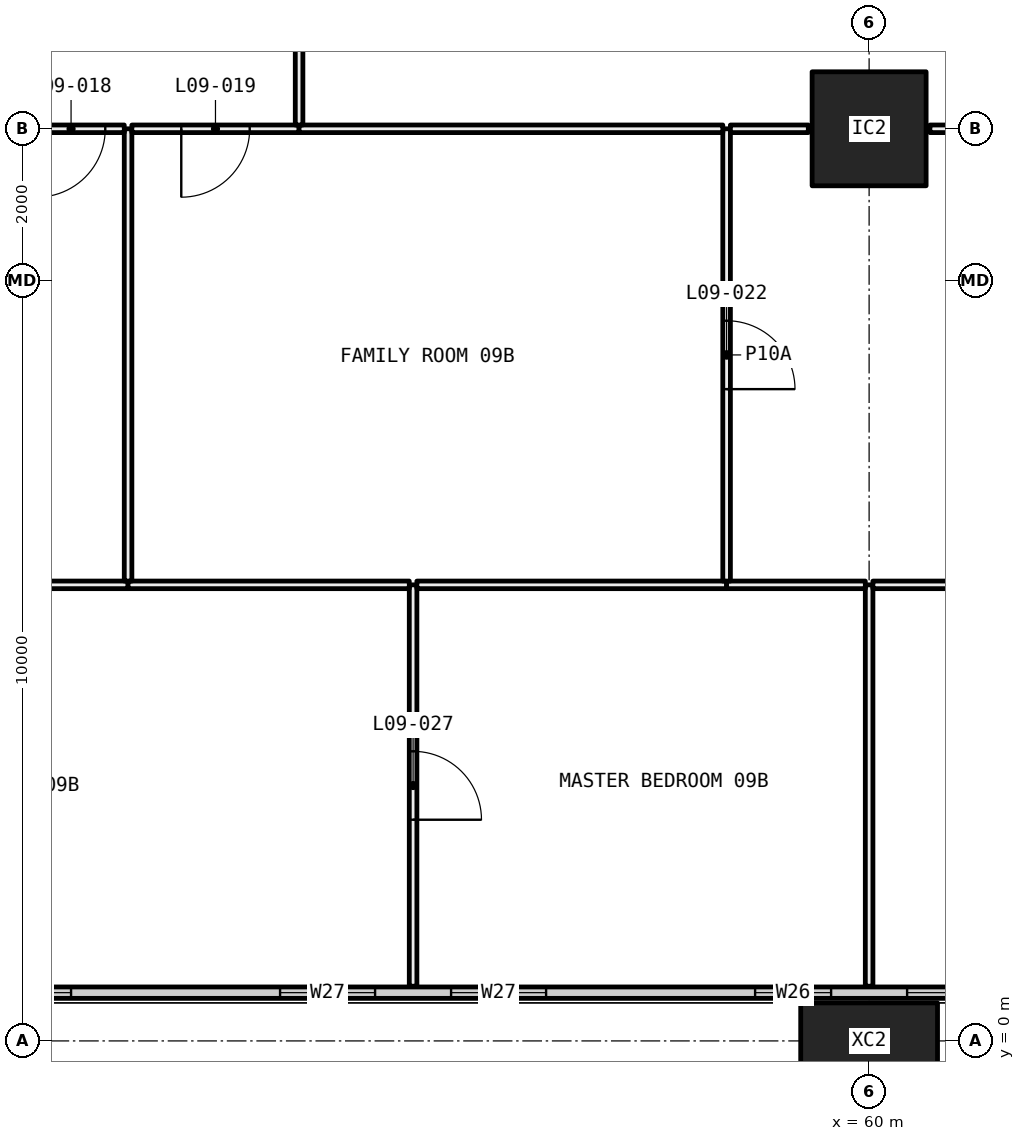
"""IFC4 building model, lengths in metres.
Left out: names, types, materials, properties, quantities, classifications, styles, units other than length and angle.
Written with IfcOpenShell. Run it as: python <this file> out.ifc"""

import sys

from ifc_helpers import new_model, si_unit, direction, frame, frame_2d, origin, origin_2d, place, context, subcontext, project, spatial, rectangle, hollow_rectangle, extrude, element, fill, save


model = new_model("IFC4")
c1 = context("Model", 3, precision=1e-05, world=origin(), true_north=direction((0.0, 1.0)))
c2 = subcontext(c1, "Body", "Model", "MODEL_VIEW")
j1 = project(units=[si_unit("LENGTHUNIT", "METRE"), si_unit("PLANEANGLEUNIT", "RADIAN")], contexts=[c1])
p1 = place(None, origin())
s1 = spatial("IfcSite", under=j1, at=p1, CompositionType="ELEMENT")
p2 = place(p1, origin())
s2 = spatial("IfcBuilding", under=s1, at=p2, CompositionType="ELEMENT")
p3 = place(p2, frame((0.0, 0.0, 43.8)))
s3 = spatial("IfcBuildingStorey", under=s2, at=p3, CompositionType="ELEMENT", Elevation=43.8)
p4 = place(p3, frame((60.0, 0.0, -0.4), z_axis=(0.0, 0.0, 1.0), x_axis=(1.0, 0.0, 0.0)))
e1 = element("IfcColumn", 1, at=p4, inside=s3, PredefinedType="COLUMN", context=c2, shape_type="SweptSolid", body=[
    extrude(hollow_rectangle(XDim=1.8, YDim=1.0, WallThickness=0.07, at=origin_2d()), origin(), (0.0, 0.0, 1.0), 3.45),
])
p5 = place(p3, frame((60.0, 12.0, 0.0), z_axis=(0.0, 0.0, 1.0), x_axis=(1.0, 0.0, 0.0)))
e2 = element("IfcColumn", 2, at=p5, inside=s3, PredefinedType="COLUMN", context=c2, shape_type="SweptSolid", body=[
    extrude(hollow_rectangle(XDim=1.5, YDim=1.5, WallThickness=0.065, at=origin_2d()), origin(), (0.0, 0.0, 1.0), 3.05),
])
p6 = place(p3, frame((6.56, 0.635, 0.0), z_axis=(0.0, 0.0, 1.0), x_axis=(1.0, 0.0, 0.0)))
e3 = element("IfcWall", 3, at=p6, inside=s3, PredefinedType="ELEMENTEDWALL", context=c2, shape_type="SweptSolid", body=[
    extrude(rectangle(XDim=58.88, YDim=0.15, at=frame_2d((29.44, 0.0))), origin(), (0.0, 0.0, 1.0), 3.05),
])
p7 = place(p6, frame((0.44, 0.0, 0.45)))
e4 = element("IfcOpeningElement", 4, at=p7, cuts=e3, PredefinedType="OPENING", context=c2, shape_type="SweptSolid", body=[
    extrude(rectangle(XDim=4.5, YDim=2.55, at=frame_2d((2.25, 1.275))), frame((0.0, 0.085, 0.0), z_axis=(0.0, -1.0, 0.0), x_axis=(1.0, 0.0, 0.0)), (0.0, 0.0, 1.0), 0.17),
])
p8 = place(p6, frame((5.94, 0.0, 0.45)))
e5 = element("IfcOpeningElement", 5, at=p8, cuts=e3, PredefinedType="OPENING", context=c2, shape_type="SweptSolid", body=[
    extrude(rectangle(XDim=1.0, YDim=2.55, at=frame_2d((0.5, 1.275))), frame((0.0, 0.085, 0.0), z_axis=(0.0, -1.0, 0.0), x_axis=(1.0, 0.0, 0.0)), (0.0, 0.0, 1.0), 0.17),
])
p9 = place(p6, frame((9.69, 0.0, 0.45)))
e6 = element("IfcOpeningElement", 6, at=p9, cuts=e3, PredefinedType="OPENING", context=c2, shape_type="SweptSolid", body=[
    extrude(rectangle(XDim=1.25, YDim=2.55, at=frame_2d((0.625, 1.275))), frame((0.0, 0.085, 0.0), z_axis=(0.0, -1.0, 0.0), x_axis=(1.0, 0.0, 0.0)), (0.0, 0.0, 1.0), 0.17),
])
p10 = place(p6, frame((11.94, 0.0, 0.45)))
e7 = element("IfcOpeningElement", 7, at=p10, cuts=e3, PredefinedType="OPENING", context=c2, shape_type="SweptSolid", body=[
    extrude(rectangle(XDim=1.25, YDim=2.55, at=frame_2d((0.625, 1.275))), frame((0.0, 0.085, 0.0), z_axis=(0.0, -1.0, 0.0), x_axis=(1.0, 0.0, 0.0)), (0.0, 0.0, 1.0), 0.17),
])
p11 = place(p6, frame((15.94, 0.0, 0.45)))
e8 = element("IfcOpeningElement", 8, at=p11, cuts=e3, PredefinedType="OPENING", context=c2, shape_type="SweptSolid", body=[
    extrude(rectangle(XDim=1.0, YDim=2.55, at=frame_2d((0.5, 1.275))), frame((0.0, 0.085, 0.0), z_axis=(0.0, -1.0, 0.0), x_axis=(1.0, 0.0, 0.0)), (0.0, 0.0, 1.0), 0.17),
])
p12 = place(p6, frame((17.94, 0.0, 0.45)))
e9 = element("IfcOpeningElement", 9, at=p12, cuts=e3, PredefinedType="OPENING", context=c2, shape_type="SweptSolid", body=[
    extrude(rectangle(XDim=1.0, YDim=2.55, at=frame_2d((0.5, 1.275))), frame((0.0, 0.085, 0.0), z_axis=(0.0, -1.0, 0.0), x_axis=(1.0, 0.0, 0.0)), (0.0, 0.0, 1.0), 0.17),
])
p13 = place(p6, frame((21.69, 0.0, 0.45)))
e10 = element("IfcOpeningElement", 10, at=p13, cuts=e3, PredefinedType="OPENING", context=c2, shape_type="SweptSolid", body=[
    extrude(rectangle(XDim=1.25, YDim=2.55, at=frame_2d((0.625, 1.275))), frame((0.0, 0.085, 0.0), z_axis=(0.0, -1.0, 0.0), x_axis=(1.0, 0.0, 0.0)), (0.0, 0.0, 1.0), 0.17),
])
p14 = place(p6, frame((23.94, 0.0, 0.45)))
e11 = element("IfcOpeningElement", 11, at=p14, cuts=e3, PredefinedType="OPENING", context=c2, shape_type="SweptSolid", body=[
    extrude(rectangle(XDim=1.25, YDim=2.55, at=frame_2d((0.625, 1.275))), frame((0.0, 0.085, 0.0), z_axis=(0.0, -1.0, 0.0), x_axis=(1.0, 0.0, 0.0)), (0.0, 0.0, 1.0), 0.17),
])
p15 = place(p6, frame((27.94, 0.0, 0.45)))
e12 = element("IfcOpeningElement", 12, at=p15, cuts=e3, PredefinedType="OPENING", context=c2, shape_type="SweptSolid", body=[
    extrude(rectangle(XDim=1.0, YDim=2.55, at=frame_2d((0.5, 1.275))), frame((0.0, 0.085, 0.0), z_axis=(0.0, -1.0, 0.0), x_axis=(1.0, 0.0, 0.0)), (0.0, 0.0, 1.0), 0.17),
])
p16 = place(p6, frame((29.94, 0.0, 0.45)))
e13 = element("IfcOpeningElement", 13, at=p16, cuts=e3, PredefinedType="OPENING", context=c2, shape_type="SweptSolid", body=[
    extrude(rectangle(XDim=1.0, YDim=2.55, at=frame_2d((0.5, 1.275))), frame((0.0, 0.085, 0.0), z_axis=(0.0, -1.0, 0.0), x_axis=(1.0, 0.0, 0.0)), (0.0, 0.0, 1.0), 0.17),
])
p17 = place(p6, frame((33.69, 0.0, 0.45)))
e14 = element("IfcOpeningElement", 14, at=p17, cuts=e3, PredefinedType="OPENING", context=c2, shape_type="SweptSolid", body=[
    extrude(rectangle(XDim=1.25, YDim=2.55, at=frame_2d((0.625, 1.275))), frame((0.0, 0.085, 0.0), z_axis=(0.0, -1.0, 0.0), x_axis=(1.0, 0.0, 0.0)), (0.0, 0.0, 1.0), 0.17),
])
p18 = place(p6, frame((35.94, 0.0, 0.45)))
e15 = element("IfcOpeningElement", 15, at=p18, cuts=e3, PredefinedType="OPENING", context=c2, shape_type="SweptSolid", body=[
    extrude(rectangle(XDim=1.25, YDim=2.55, at=frame_2d((0.625, 1.275))), frame((0.0, 0.085, 0.0), z_axis=(0.0, -1.0, 0.0), x_axis=(1.0, 0.0, 0.0)), (0.0, 0.0, 1.0), 0.17),
])
p19 = place(p6, frame((39.94, 0.0, 0.45)))
e16 = element("IfcOpeningElement", 16, at=p19, cuts=e3, PredefinedType="OPENING", context=c2, shape_type="SweptSolid", body=[
    extrude(rectangle(XDim=1.0, YDim=2.55, at=frame_2d((0.5, 1.275))), frame((0.0, 0.085, 0.0), z_axis=(0.0, -1.0, 0.0), x_axis=(1.0, 0.0, 0.0)), (0.0, 0.0, 1.0), 0.17),
])
p20 = place(p6, frame((41.94, 0.0, 0.45)))
e17 = element("IfcOpeningElement", 17, at=p20, cuts=e3, PredefinedType="OPENING", context=c2, shape_type="SweptSolid", body=[
    extrude(rectangle(XDim=1.0, YDim=2.55, at=frame_2d((0.5, 1.275))), frame((0.0, 0.085, 0.0), z_axis=(0.0, -1.0, 0.0), x_axis=(1.0, 0.0, 0.0)), (0.0, 0.0, 1.0), 0.17),
])
p21 = place(p6, frame((45.69, 0.0, 0.45)))
e18 = element("IfcOpeningElement", 18, at=p21, cuts=e3, PredefinedType="OPENING", context=c2, shape_type="SweptSolid", body=[
    extrude(rectangle(XDim=1.25, YDim=2.55, at=frame_2d((0.625, 1.275))), frame((0.0, 0.085, 0.0), z_axis=(0.0, -1.0, 0.0), x_axis=(1.0, 0.0, 0.0)), (0.0, 0.0, 1.0), 0.17),
])
p22 = place(p6, frame((47.94, 0.0, 0.45)))
e19 = element("IfcOpeningElement", 19, at=p22, cuts=e3, PredefinedType="OPENING", context=c2, shape_type="SweptSolid", body=[
    extrude(rectangle(XDim=1.25, YDim=2.55, at=frame_2d((0.625, 1.275))), frame((0.0, 0.085, 0.0), z_axis=(0.0, -1.0, 0.0), x_axis=(1.0, 0.0, 0.0)), (0.0, 0.0, 1.0), 0.17),
])
p23 = place(p6, frame((51.94, 0.0, 0.45)))
e20 = element("IfcOpeningElement", 20, at=p23, cuts=e3, PredefinedType="OPENING", context=c2, shape_type="SweptSolid", body=[
    extrude(rectangle(XDim=1.0, YDim=2.55, at=frame_2d((0.5, 1.275))), frame((0.0, 0.085, 0.0), z_axis=(0.0, -1.0, 0.0), x_axis=(1.0, 0.0, 0.0)), (0.0, 0.0, 1.0), 0.17),
])
p24 = place(p6, frame((53.94, 0.0, 0.45)))
e21 = element("IfcOpeningElement", 21, at=p24, cuts=e3, PredefinedType="OPENING", context=c2, shape_type="SweptSolid", body=[
    extrude(rectangle(XDim=4.5, YDim=2.55, at=frame_2d((2.25, 1.275))), frame((0.0, 0.085, 0.0), z_axis=(0.0, -1.0, 0.0), x_axis=(1.0, 0.0, 0.0)), (0.0, 0.0, 1.0), 0.17),
])
p25 = place(p3, frame((54.0, 0.72, 0.0), z_axis=(0.0, 0.0, 1.0), x_axis=(0.0, 1.0, 0.0)))
e22 = element("IfcWall", 22, at=p25, inside=s3, PredefinedType="PARTITIONING", context=c2, shape_type="SweptSolid", body=[
    extrude(rectangle(XDim=5.28, YDim=0.1, at=frame_2d((2.64, 0.0))), origin(), (0.0, 0.0, 1.0), 3.05),
])
p26 = place(p25, frame((2.19, 0.0, 0.0)))
e23 = element("IfcOpeningElement", 23, at=p26, cuts=e22, PredefinedType="OPENING", context=c2, shape_type="SweptSolid", body=[
    extrude(rectangle(XDim=0.9, YDim=2.1, at=frame_2d((0.45, 1.05))), frame((0.0, 0.06, 0.0), z_axis=(0.0, -1.0, 0.0), x_axis=(1.0, 0.0, 0.0)), (0.0, 0.0, 1.0), 0.12),
])
p27 = place(p3, frame((50.25, 6.0, 0.0), z_axis=(0.0, 0.0, 1.0), x_axis=(-1.0, 0.0, 0.0)))
e24 = element("IfcWall", 24, at=p27, inside=s3, PredefinedType="PARTITIONING", context=c2, shape_type="SweptSolid", body=[
    extrude(rectangle(XDim=2.35, YDim=0.1, at=frame_2d((1.175, 0.0))), origin(), (0.0, 0.0, 1.0), 2.45),
])
p28 = place(p3, frame((53.95, 6.0, 0.0), z_axis=(0.0, 0.0, 1.0), x_axis=(-1.0, 0.0, 0.0)))
e25 = element("IfcWall", 25, at=p28, inside=s3, PredefinedType="PARTITIONING", context=c2, shape_type="SweptSolid", body=[
    extrude(rectangle(XDim=3.7, YDim=0.1, at=frame_2d((1.85, 0.0))), origin(), (0.0, 0.0, 1.0), 3.05),
])
p29 = place(p3, frame((60.0, 0.72, 0.0), z_axis=(0.0, 0.0, 1.0), x_axis=(0.0, 1.0, 0.0)))
e26 = element("IfcWall", 26, at=p29, inside=s3, PredefinedType="PARTITIONING", context=c2, shape_type="SweptSolid", body=[
    extrude(rectangle(XDim=5.28, YDim=0.1, at=frame_2d((2.64, 0.0))), origin(), (0.0, 0.0, 1.0), 2.45),
])
p30 = place(p3, frame((58.125, 6.0, 0.0), z_axis=(0.0, 0.0, 1.0), x_axis=(-1.0, 0.0, 0.0)))
e27 = element("IfcWall", 27, at=p30, inside=s3, PredefinedType="PARTITIONING", context=c2, shape_type="SweptSolid", body=[
    extrude(rectangle(XDim=4.075, YDim=0.1, at=frame_2d((2.038, 0.0))), origin(), (0.0, 0.0, 1.0), 3.05),
])
p31 = place(p3, frame((59.95, 6.0, 0.0), z_axis=(0.0, 0.0, 1.0), x_axis=(-1.0, 0.0, 0.0)))
e28 = element("IfcWall", 28, at=p31, inside=s3, PredefinedType="PARTITIONING", context=c2, shape_type="SweptSolid", body=[
    extrude(rectangle(XDim=1.825, YDim=0.1, at=frame_2d((0.913, 0.0))), origin(), (0.0, 0.0, 1.0), 2.45),
])
p32 = place(p3, frame((65.28, 6.0, 0.0), z_axis=(0.0, 0.0, 1.0), x_axis=(-1.0, 0.0, 0.0)))
e29 = element("IfcWall", 29, at=p32, inside=s3, PredefinedType="PARTITIONING", context=c2, shape_type="SweptSolid", body=[
    extrude(rectangle(XDim=5.23, YDim=0.1, at=frame_2d((2.615, 0.0))), origin(), (0.0, 0.0, 1.0), 2.45),
])
p33 = place(p32, frame((2.165, 0.0, 0.0)))
e30 = element("IfcOpeningElement", 30, at=p33, cuts=e29, PredefinedType="OPENING", context=c2, shape_type="SweptSolid", body=[
    extrude(rectangle(XDim=0.9, YDim=2.1, at=frame_2d((0.45, 1.05))), frame((0.0, 0.06, 0.0), z_axis=(0.0, -1.0, 0.0), x_axis=(1.0, 0.0, 0.0)), (0.0, 0.0, 1.0), 0.12),
])
p34 = place(p3, frame((50.25, 6.05, 0.0), z_axis=(0.0, 0.0, 1.0), x_axis=(0.0, 1.0, 0.0)))
e31 = element("IfcWall", 31, at=p34, inside=s3, PredefinedType="PARTITIONING", context=c2, shape_type="SweptSolid", body=[
    extrude(rectangle(XDim=5.95, YDim=0.1, at=frame_2d((2.975, 0.0))), origin(), (0.0, 0.0, 1.0), 2.45),
])
p35 = place(p3, frame((50.2, 12.0, 0.0), z_axis=(0.0, 0.0, 1.0), x_axis=(-1.0, 0.0, 0.0)))
e32 = element("IfcWall", 32, at=p35, inside=s3, PredefinedType="PARTITIONING", context=c2, shape_type="SweptSolid", body=[
    extrude(rectangle(XDim=1.4, YDim=0.1, at=frame_2d((0.7, 0.0))), origin(), (0.0, 0.0, 1.0), 2.45),
])
p36 = place(p35, frame((0.25, 0.0, 0.0)))
e33 = element("IfcOpeningElement", 33, at=p36, cuts=e32, PredefinedType="OPENING", context=c2, shape_type="SweptSolid", body=[
    extrude(rectangle(XDim=0.9, YDim=2.1, at=frame_2d((0.45, 1.05))), frame((0.0, 0.06, 0.0), z_axis=(0.0, -1.0, 0.0), x_axis=(1.0, 0.0, 0.0)), (0.0, 0.0, 1.0), 0.12),
])
p37 = place(p3, frame((58.125, 6.05, 0.0), z_axis=(0.0, 0.0, 1.0), x_axis=(0.0, 1.0, 0.0)))
e34 = element("IfcWall", 34, at=p37, inside=s3, PredefinedType="PARTITIONING", context=c2, shape_type="SweptSolid", body=[
    extrude(rectangle(XDim=5.95, YDim=0.1, at=frame_2d((2.975, 0.0))), origin(), (0.0, 0.0, 1.0), 2.45),
])
p38 = place(p37, frame((2.525, 0.0, 0.0)))
e35 = element("IfcOpeningElement", 35, at=p38, cuts=e34, PredefinedType="OPENING", context=c2, shape_type="SweptSolid", body=[
    extrude(rectangle(XDim=0.9, YDim=2.1, at=frame_2d((0.45, 1.05))), frame((0.0, 0.06, 0.0), z_axis=(0.0, -1.0, 0.0), x_axis=(1.0, 0.0, 0.0)), (0.0, 0.0, 1.0), 0.12),
])
p39 = place(p3, frame((52.5, 12.0, 0.0), z_axis=(0.0, 0.0, 1.0), x_axis=(-1.0, 0.0, 0.0)))
e36 = element("IfcWall", 36, at=p39, inside=s3, PredefinedType="PARTITIONING", context=c2, shape_type="SweptSolid", body=[
    extrude(rectangle(XDim=2.2, YDim=0.1, at=frame_2d((1.1, 0.0))), origin(), (0.0, 0.0, 1.0), 2.45),
])
p40 = place(p39, frame((0.65, 0.0, 0.0)))
e37 = element("IfcOpeningElement", 37, at=p40, cuts=e36, PredefinedType="OPENING", context=c2, shape_type="SweptSolid", body=[
    extrude(rectangle(XDim=0.9, YDim=2.1, at=frame_2d((0.45, 1.05))), frame((0.0, 0.06, 0.0), z_axis=(0.0, -1.0, 0.0), x_axis=(1.0, 0.0, 0.0)), (0.0, 0.0, 1.0), 0.12),
])
p41 = place(p3, frame((58.075, 12.0, 0.0), z_axis=(0.0, 0.0, 1.0), x_axis=(-1.0, 0.0, 0.0)))
e38 = element("IfcWall", 38, at=p41, inside=s3, PredefinedType="PARTITIONING", context=c2, shape_type="SweptSolid", body=[
    extrude(rectangle(XDim=5.575, YDim=0.1, at=frame_2d((2.788, 0.0))), origin(), (0.0, 0.0, 1.0), 2.45),
])
p42 = place(p3, frame((59.2, 12.0, 0.0), z_axis=(0.0, 0.0, 1.0), x_axis=(-1.0, 0.0, 0.0)))
e39 = element("IfcWall", 39, at=p42, inside=s3, PredefinedType="PARTITIONING", context=c2, shape_type="SweptSolid", body=[
    extrude(rectangle(XDim=1.025, YDim=0.1, at=frame_2d((0.512, 0.0))), origin(), (0.0, 0.0, 1.0), 2.45),
])
p43 = place(p3, frame((61.425, 12.0, 0.0), z_axis=(0.0, 0.0, 1.0), x_axis=(-1.0, 0.0, 0.0)))
e40 = element("IfcWall", 40, at=p43, inside=s3, PredefinedType="PARTITIONING", context=c2, shape_type="SweptSolid", body=[
    extrude(rectangle(XDim=0.625, YDim=0.1, at=frame_2d((0.312, 0.0))), origin(), (0.0, 0.0, 1.0), 2.45),
])
p44 = place(p3, frame((52.5, 12.05, 0.0), z_axis=(0.0, 0.0, 1.0), x_axis=(0.0, 1.0, 0.0)))
e41 = element("IfcWall", 41, at=p44, inside=s3, PredefinedType="PARTITIONING", context=c2, shape_type="SweptSolid", body=[
    extrude(rectangle(XDim=5.85, YDim=0.1, at=frame_2d((2.925, 0.0))), origin(), (0.0, 0.0, 1.0), 2.45),
])
p45 = place(p44, frame((2.475, 0.0, 0.0)))
e42 = element("IfcOpeningElement", 42, at=p45, cuts=e41, PredefinedType="OPENING", context=c2, shape_type="SweptSolid", body=[
    extrude(rectangle(XDim=0.9, YDim=2.1, at=frame_2d((0.45, 1.05))), frame((0.0, 0.06, 0.0), z_axis=(0.0, -1.0, 0.0), x_axis=(1.0, 0.0, 0.0)), (0.0, 0.0, 1.0), 0.12),
])
p46 = place(p20, origin())
e43 = element("IfcWindow", 43, at=p46, inside=s3, PartitioningType="SINGLE_PANEL", PredefinedType="WINDOW", context=c2, shape_type="SweptSolid", body=[
    extrude(rectangle(XDim=1.0, YDim=2.55, at=frame_2d((0.5, 1.275))), frame((0.0, 0.03, 0.0), z_axis=(0.0, -1.0, 0.0), x_axis=(1.0, 0.0, 0.0)), (0.0, 0.0, 1.0), 0.06),
])
fill(e17, e43)
p47 = place(p21, origin())
e44 = element("IfcWindow", 44, at=p47, inside=s3, PartitioningType="SINGLE_PANEL", PredefinedType="WINDOW", context=c2, shape_type="SweptSolid", body=[
    extrude(rectangle(XDim=1.25, YDim=2.55, at=frame_2d((0.625, 1.275))), frame((0.0, 0.03, 0.0), z_axis=(0.0, -1.0, 0.0), x_axis=(1.0, 0.0, 0.0)), (0.0, 0.0, 1.0), 0.06),
])
fill(e18, e44)
p48 = place(p22, origin())
e45 = element("IfcWindow", 45, at=p48, inside=s3, PartitioningType="SINGLE_PANEL", PredefinedType="WINDOW", context=c2, shape_type="SweptSolid", body=[
    extrude(rectangle(XDim=1.25, YDim=2.55, at=frame_2d((0.625, 1.275))), frame((0.0, 0.03, 0.0), z_axis=(0.0, -1.0, 0.0), x_axis=(1.0, 0.0, 0.0)), (0.0, 0.0, 1.0), 0.06),
])
fill(e19, e45)
p49 = place(p23, origin())
e46 = element("IfcWindow", 46, at=p49, inside=s3, PartitioningType="SINGLE_PANEL", PredefinedType="WINDOW", context=c2, shape_type="SweptSolid", body=[
    extrude(rectangle(XDim=1.0, YDim=2.55, at=frame_2d((0.5, 1.275))), frame((0.0, 0.03, 0.0), z_axis=(0.0, -1.0, 0.0), x_axis=(1.0, 0.0, 0.0)), (0.0, 0.0, 1.0), 0.06),
])
fill(e20, e46)
p50 = place(p24, origin())
e47 = element("IfcWindow", 47, at=p50, inside=s3, PartitioningType="SINGLE_PANEL", PredefinedType="WINDOW", context=c2, shape_type="SweptSolid", body=[
    extrude(rectangle(XDim=4.5, YDim=2.55, at=frame_2d((2.25, 1.275))), frame((0.0, 0.03, 0.0), z_axis=(0.0, -1.0, 0.0), x_axis=(1.0, 0.0, 0.0)), (0.0, 0.0, 1.0), 0.06),
])
fill(e21, e47)
p51 = place(p36, origin())
e48 = element("IfcDoor", 48, at=p51, inside=s3, OperationType="SINGLE_SWING_LEFT", PredefinedType="DOOR", context=c2, shape_type="SweptSolid", body=[
    extrude(rectangle(XDim=0.9, YDim=2.1, at=frame_2d((0.45, 1.05))), frame((0.0, 0.025, 0.0), z_axis=(0.0, -1.0, 0.0), x_axis=(1.0, 0.0, 0.0)), (0.0, 0.0, 1.0), 0.05),
])
fill(e33, e48)
p52 = place(p40, origin())
e49 = element("IfcDoor", 49, at=p52, inside=s3, OperationType="SINGLE_SWING_LEFT", PredefinedType="DOOR", context=c2, shape_type="SweptSolid", body=[
    extrude(rectangle(XDim=0.9, YDim=2.1, at=frame_2d((0.45, 1.05))), frame((0.0, 0.025, 0.0), z_axis=(0.0, -1.0, 0.0), x_axis=(1.0, 0.0, 0.0)), (0.0, 0.0, 1.0), 0.05),
])
fill(e37, e49)
p53 = place(p38, frame((0.9, 0.0, 0.0), x_axis=(-1.0, 0.0, 0.0)))
e50 = element("IfcDoor", 50, at=p53, inside=s3, OperationType="SINGLE_SWING_LEFT", PredefinedType="DOOR", context=c2, shape_type="SweptSolid", body=[
    extrude(rectangle(XDim=0.9, YDim=2.1, at=frame_2d((0.45, 1.05))), frame((0.0, 0.025, 0.0), z_axis=(0.0, -1.0, 0.0), x_axis=(1.0, 0.0, 0.0)), (0.0, 0.0, 1.0), 0.05),
])
fill(e35, e50)
p54 = place(p26, frame((0.9, 0.0, 0.0), x_axis=(-1.0, 0.0, 0.0)))
e51 = element("IfcDoor", 51, at=p54, inside=s3, OperationType="SINGLE_SWING_LEFT", PredefinedType="DOOR", context=c2, shape_type="SweptSolid", body=[
    extrude(rectangle(XDim=0.9, YDim=2.1, at=frame_2d((0.45, 1.05))), frame((0.0, 0.025, 0.0), z_axis=(0.0, -1.0, 0.0), x_axis=(1.0, 0.0, 0.0)), (0.0, 0.0, 1.0), 0.05),
])
fill(e23, e51)
save(model, sys.argv[1])
